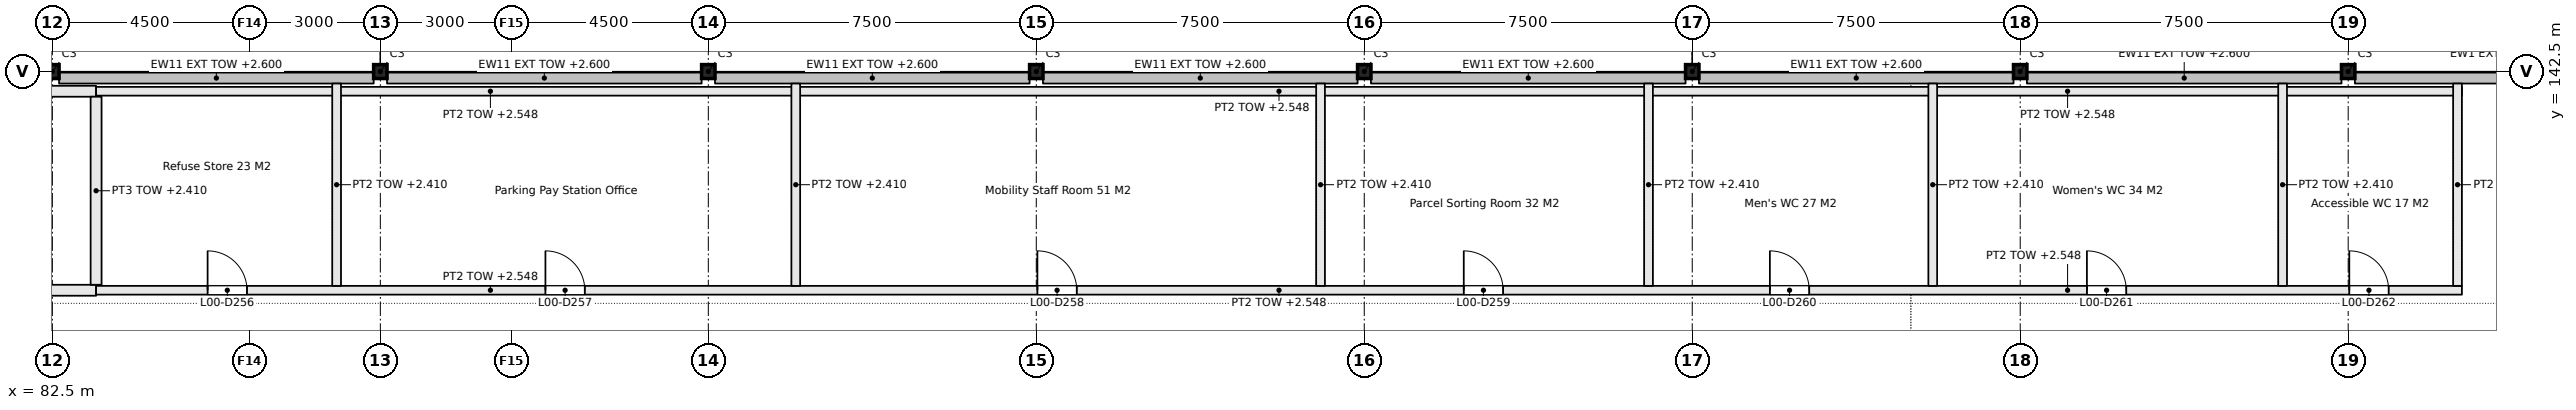
"""IFC4 building model, lengths in metres.
Left out: names, types, materials, properties, quantities, classifications, styles, units other than length and angle.
Written with IfcOpenShell. Run it as: python <this file> out.ifc"""

import sys

from ifc_helpers import new_model, si_unit, direction, frame, frame_2d, origin, origin_2d, place, context, subcontext, project, spatial, rectangle, i_section, extrude, element, fill, save


model = new_model("IFC4")
c1 = context("Model", 3, precision=1e-05, world=origin(), true_north=direction((0.0, 1.0)))
c2 = subcontext(c1, "Body", "Model", "MODEL_VIEW")
j1 = project(units=[si_unit("LENGTHUNIT", "METRE"), si_unit("PLANEANGLEUNIT", "RADIAN")], contexts=[c1])
p1 = place(None, origin())
s1 = spatial("IfcSite", under=j1, at=p1, CompositionType="ELEMENT")
p2 = place(p1, origin())
s2 = spatial("IfcBuilding", under=s1, at=p2, CompositionType="ELEMENT")
p3 = place(p2, origin())
s3 = spatial("IfcBuildingStorey", under=s2, at=p3, CompositionType="ELEMENT", Elevation=0.0)
for number, where, z_axis, x_axis in (
    (1, (82.5, 142.5, -0.25), (0.0, 0.0, 1.0), (1.0, 0.0, 0.0)),
    (2, (90.0, 142.5, -0.25), (0.0, 0.0, 1.0), (1.0, 0.0, 0.0)),
    (3, (97.5, 142.5, -0.25), (0.0, 0.0, 1.0), (1.0, 0.0, 0.0)),
    (4, (105.0, 142.5, -0.25), (0.0, 0.0, 1.0), (1.0, 0.0, 0.0)),
    (5, (112.5, 142.5, -0.25), (0.0, 0.0, 1.0), (1.0, 0.0, 0.0)),
    (6, (120.0, 142.5, -0.25), (0.0, 0.0, 1.0), (1.0, 0.0, 0.0)),
    (7, (127.5, 142.5, -0.25), (0.0, 0.0, 1.0), (1.0, 0.0, 0.0)),
    (8, (135.0, 142.5, -0.25), (0.0, 0.0, 1.0), (1.0, 0.0, 0.0)),
):
    element("IfcColumn", number, at=place(p3, frame(where, z_axis=z_axis, x_axis=x_axis)), inside=s3, PredefinedType="COLUMN", context=c2, shape_type="SweptSolid", body=[
        extrude(i_section(OverallWidth=0.307, OverallDepth=0.318, WebThickness=0.013, FlangeThickness=0.021, FilletRadius=0.015, at=origin_2d()), origin(), (0.0, 0.0, 1.0), 3.55),
    ])
p4 = place(p3, frame((78.0, 137.5, 0.0), z_axis=(0.0, 0.0, 1.0), x_axis=(1.0, 0.0, 0.0)))
e9 = element("IfcWall", 9, at=p4, inside=s3, PredefinedType="PARTITIONING", context=c2, shape_type="SweptSolid", body=[
    extrude(rectangle(XDim=5.5, YDim=0.25, at=frame_2d((2.75, 0.0))), origin(), (0.0, 0.0, 1.0), 2.548),
])
p5 = place(p4, frame((2.3, 0.0, 0.0)))
e10 = element("IfcOpeningElement", 10, at=p5, cuts=e9, PredefinedType="OPENING", context=c2, shape_type="SweptSolid", body=[
    extrude(rectangle(XDim=0.9, YDim=2.1, at=frame_2d((0.45, 1.05))), frame((0.0, 0.135, 0.0), z_axis=(0.0, -1.0, 0.0), x_axis=(1.0, 0.0, 0.0)), (0.0, 0.0, 1.0), 0.27),
])
p6 = place(p3, frame((83.5, 137.5, 0.0), z_axis=(0.0, 0.0, 1.0), x_axis=(1.0, 0.0, 0.0)))
e11 = element("IfcWall", 11, at=p6, inside=s3, PredefinedType="PARTITIONING", context=c2, shape_type="SweptSolid", body=[
    extrude(rectangle(XDim=54.1, YDim=0.2, at=frame_2d((27.05, 0.0))), origin(), (0.0, 0.0, 1.0), 2.548),
])
p7 = place(p6, frame((2.55, 0.0, 0.0)))
e12 = element("IfcOpeningElement", 12, at=p7, cuts=e11, PredefinedType="OPENING", context=c2, shape_type="SweptSolid", body=[
    extrude(rectangle(XDim=0.9, YDim=2.1, at=frame_2d((0.45, 1.05))), frame((0.0, 0.11, 0.0), z_axis=(0.0, -1.0, 0.0), x_axis=(1.0, 0.0, 0.0)), (0.0, 0.0, 1.0), 0.22),
])
p8 = place(p6, frame((10.275, 0.0, 0.0)))
e13 = element("IfcOpeningElement", 13, at=p8, cuts=e11, PredefinedType="OPENING", context=c2, shape_type="SweptSolid", body=[
    extrude(rectangle(XDim=0.9, YDim=2.1, at=frame_2d((0.45, 1.05))), frame((0.0, 0.11, 0.0), z_axis=(0.0, -1.0, 0.0), x_axis=(1.0, 0.0, 0.0)), (0.0, 0.0, 1.0), 0.22),
])
p9 = place(p6, frame((21.525, 0.0, 0.0)))
e14 = element("IfcOpeningElement", 14, at=p9, cuts=e11, PredefinedType="OPENING", context=c2, shape_type="SweptSolid", body=[
    extrude(rectangle(XDim=0.9, YDim=2.1, at=frame_2d((0.45, 1.05))), frame((0.0, 0.11, 0.0), z_axis=(0.0, -1.0, 0.0), x_axis=(1.0, 0.0, 0.0)), (0.0, 0.0, 1.0), 0.22),
])
p10 = place(p6, frame((31.275, 0.0, 0.0)))
e15 = element("IfcOpeningElement", 15, at=p10, cuts=e11, PredefinedType="OPENING", context=c2, shape_type="SweptSolid", body=[
    extrude(rectangle(XDim=0.9, YDim=2.1, at=frame_2d((0.45, 1.05))), frame((0.0, 0.11, 0.0), z_axis=(0.0, -1.0, 0.0), x_axis=(1.0, 0.0, 0.0)), (0.0, 0.0, 1.0), 0.22),
])
p11 = place(p6, frame((38.275, 0.0, 0.0)))
e16 = element("IfcOpeningElement", 16, at=p11, cuts=e11, PredefinedType="OPENING", context=c2, shape_type="SweptSolid", body=[
    extrude(rectangle(XDim=0.9, YDim=2.1, at=frame_2d((0.45, 1.05))), frame((0.0, 0.11, 0.0), z_axis=(0.0, -1.0, 0.0), x_axis=(1.0, 0.0, 0.0)), (0.0, 0.0, 1.0), 0.22),
])
p12 = place(p6, frame((45.525, 0.0, 0.0)))
e17 = element("IfcOpeningElement", 17, at=p12, cuts=e11, PredefinedType="OPENING", context=c2, shape_type="SweptSolid", body=[
    extrude(rectangle(XDim=0.9, YDim=2.1, at=frame_2d((0.45, 1.05))), frame((0.0, 0.11, 0.0), z_axis=(0.0, -1.0, 0.0), x_axis=(1.0, 0.0, 0.0)), (0.0, 0.0, 1.0), 0.22),
])
p13 = place(p6, frame((51.525, 0.0, 0.0)))
e18 = element("IfcOpeningElement", 18, at=p13, cuts=e11, PredefinedType="OPENING", context=c2, shape_type="SweptSolid", body=[
    extrude(rectangle(XDim=0.9, YDim=2.1, at=frame_2d((0.45, 1.05))), frame((0.0, 0.11, 0.0), z_axis=(0.0, -1.0, 0.0), x_axis=(1.0, 0.0, 0.0)), (0.0, 0.0, 1.0), 0.22),
])
p14 = place(p3, frame((78.0, 142.05, 0.0), z_axis=(0.0, 0.0, 1.0), x_axis=(1.0, 0.0, 0.0)))
e19 = element("IfcWall", 19, at=p14, inside=s3, PredefinedType="PARTITIONING", context=c2, shape_type="SweptSolid", body=[
    extrude(rectangle(XDim=5.5, YDim=0.25, at=frame_2d((2.75, 0.0))), origin(), (0.0, 0.0, 1.0), 2.548),
])
p15 = place(p3, frame((83.5, 142.05, 0.0), z_axis=(0.0, 0.0, 1.0), x_axis=(1.0, 0.0, 0.0)))
e20 = element("IfcWall", 20, at=p15, inside=s3, PredefinedType="PARTITIONING", context=c2, shape_type="SweptSolid", body=[
    extrude(rectangle(XDim=54.1, YDim=0.2, at=frame_2d((27.05, 0.0))), origin(), (0.0, 0.0, 1.0), 2.548),
])
p16 = place(p3, frame((83.5, 137.625, 0.0), z_axis=(0.0, 0.0, 1.0), x_axis=(0.0, 1.0, 0.0)))
e21 = element("IfcWall", 21, at=p16, inside=s3, PredefinedType="PARTITIONING", context=c2, shape_type="SweptSolid", body=[
    extrude(rectangle(XDim=4.3, YDim=0.25, at=frame_2d((2.15, 0.0))), origin(), (0.0, 0.0, 1.0), 2.41),
])
for number, where, z_axis, x_axis in (
    (22, (89.0, 137.6, 0.0), (0.0, 0.0, 1.0), (0.0, 1.0, 0.0)),
    (23, (99.5, 137.6, 0.0), (0.0, 0.0, 1.0), (0.0, 1.0, 0.0)),
    (24, (111.5, 137.6, 0.0), (0.0, 0.0, 1.0), (0.0, 1.0, 0.0)),
    (25, (119.0, 137.6, 0.0), (0.0, 0.0, 1.0), (0.0, 1.0, 0.0)),
    (26, (125.5, 137.6, 0.0), (0.0, 0.0, 1.0), (0.0, 1.0, 0.0)),
    (27, (133.5, 137.6, 0.0), (0.0, 0.0, 1.0), (0.0, 1.0, 0.0)),
):
    element("IfcWall", number, at=place(p3, frame(where, z_axis=z_axis, x_axis=x_axis)), inside=s3, PredefinedType="PARTITIONING", context=c2, shape_type="SweptSolid", body=[
        extrude(rectangle(XDim=4.626, YDim=0.2, at=frame_2d((2.313, 0.0))), origin(), (0.0, 0.0, 1.0), 2.41),
    ])
p17 = place(p3, frame((137.5, 137.6, 0.0), z_axis=(0.0, 0.0, 1.0), x_axis=(0.0, 1.0, 0.0)))
e28 = element("IfcWall", 28, at=p17, inside=s3, PredefinedType="PARTITIONING", context=c2, shape_type="SweptSolid", body=[
    extrude(rectangle(XDim=4.626, YDim=0.2, at=frame_2d((2.313, 0.0))), origin(), (0.0, 0.0, 1.0), 2.558),
])
p18 = place(p3, frame((142.347, 142.351, 0.0), z_axis=(0.0, 0.0, 1.0), x_axis=(-1.0, 0.0, 0.0)))
e29 = element("IfcWall", 29, at=p18, inside=s3, PredefinedType="SOLIDWALL", context=c2, shape_type="SweptSolid", body=[
    extrude(rectangle(XDim=7.195, YDim=0.25, at=frame_2d((3.597, 0.0))), origin(), (0.0, 0.0, 1.0), 1.1),
])
for number, where, z_axis, x_axis in (
    (30, (134.847, 142.351, 0.0), (0.0, 0.0, 1.0), (-1.0, 0.0, 0.0)),
    (31, (127.347, 142.351, 0.0), (0.0, 0.0, 1.0), (-1.0, 0.0, 0.0)),
    (32, (119.847, 142.351, 0.0), (0.0, 0.0, 1.0), (-1.0, 0.0, 0.0)),
    (33, (112.347, 142.351, 0.0), (0.0, 0.0, 1.0), (-1.0, 0.0, 0.0)),
    (34, (104.847, 142.351, 0.0), (0.0, 0.0, 1.0), (-1.0, 0.0, 0.0)),
    (35, (97.347, 142.351, 0.0), (0.0, 0.0, 1.0), (-1.0, 0.0, 0.0)),
    (36, (89.847, 142.351, 0.0), (0.0, 0.0, 1.0), (-1.0, 0.0, 0.0)),
):
    element("IfcWall", number, at=place(p3, frame(where, z_axis=z_axis, x_axis=x_axis)), inside=s3, PredefinedType="SOLIDWALL", context=c2, shape_type="SweptSolid", body=[
        extrude(rectangle(XDim=7.195, YDim=0.25, at=frame_2d((3.597, 0.0))), origin(), (0.0, 0.0, 1.0), 2.6),
    ])
p19 = place(p7, origin())
e37 = element("IfcDoor", 37, at=p19, inside=s3, OperationType="SINGLE_SWING_LEFT", PredefinedType="DOOR", context=c2, shape_type="SweptSolid", body=[
    extrude(rectangle(XDim=0.9, YDim=2.1, at=frame_2d((0.45, 1.05))), frame((0.0, 0.025, 0.0), z_axis=(0.0, -1.0, 0.0), x_axis=(1.0, 0.0, 0.0)), (0.0, 0.0, 1.0), 0.05),
])
fill(e12, e37)
p20 = place(p8, origin())
e38 = element("IfcDoor", 38, at=p20, inside=s3, OperationType="SINGLE_SWING_LEFT", PredefinedType="DOOR", context=c2, shape_type="SweptSolid", body=[
    extrude(rectangle(XDim=0.9, YDim=2.1, at=frame_2d((0.45, 1.05))), frame((0.0, 0.025, 0.0), z_axis=(0.0, -1.0, 0.0), x_axis=(1.0, 0.0, 0.0)), (0.0, 0.0, 1.0), 0.05),
])
fill(e13, e38)
p21 = place(p9, origin())
e39 = element("IfcDoor", 39, at=p21, inside=s3, OperationType="SINGLE_SWING_LEFT", PredefinedType="DOOR", context=c2, shape_type="SweptSolid", body=[
    extrude(rectangle(XDim=0.9, YDim=2.1, at=frame_2d((0.45, 1.05))), frame((0.0, 0.025, 0.0), z_axis=(0.0, -1.0, 0.0), x_axis=(1.0, 0.0, 0.0)), (0.0, 0.0, 1.0), 0.05),
])
fill(e14, e39)
p22 = place(p10, origin())
e40 = element("IfcDoor", 40, at=p22, inside=s3, OperationType="SINGLE_SWING_RIGHT", PredefinedType="DOOR", context=c2, shape_type="SweptSolid", body=[
    extrude(rectangle(XDim=0.9, YDim=2.1, at=frame_2d((0.45, 1.05))), frame((0.0, 0.025, 0.0), z_axis=(0.0, -1.0, 0.0), x_axis=(1.0, 0.0, 0.0)), (0.0, 0.0, 1.0), 0.05),
])
fill(e15, e40)
p23 = place(p11, origin())
e41 = element("IfcDoor", 41, at=p23, inside=s3, OperationType="SINGLE_SWING_RIGHT", PredefinedType="DOOR", context=c2, shape_type="SweptSolid", body=[
    extrude(rectangle(XDim=0.9, YDim=2.1, at=frame_2d((0.45, 1.05))), frame((0.0, 0.025, 0.0), z_axis=(0.0, -1.0, 0.0), x_axis=(1.0, 0.0, 0.0)), (0.0, 0.0, 1.0), 0.05),
])
fill(e16, e41)
p24 = place(p12, origin())
e42 = element("IfcDoor", 42, at=p24, inside=s3, OperationType="SINGLE_SWING_RIGHT", PredefinedType="DOOR", context=c2, shape_type="SweptSolid", body=[
    extrude(rectangle(XDim=0.9, YDim=2.1, at=frame_2d((0.45, 1.05))), frame((0.0, 0.025, 0.0), z_axis=(0.0, -1.0, 0.0), x_axis=(1.0, 0.0, 0.0)), (0.0, 0.0, 1.0), 0.05),
])
fill(e17, e42)
p25 = place(p13, origin())
e43 = element("IfcDoor", 43, at=p25, inside=s3, OperationType="SINGLE_SWING_RIGHT", PredefinedType="DOOR", context=c2, shape_type="SweptSolid", body=[
    extrude(rectangle(XDim=0.9, YDim=2.1, at=frame_2d((0.45, 1.05))), frame((0.0, 0.025, 0.0), z_axis=(0.0, -1.0, 0.0), x_axis=(1.0, 0.0, 0.0)), (0.0, 0.0, 1.0), 0.05),
])
fill(e18, e43)
save(model, sys.argv[1])
